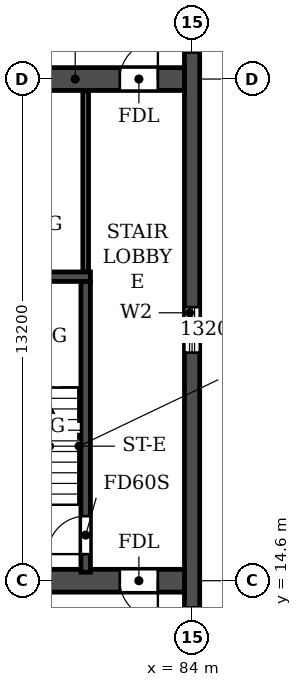
"""IFC4 building model, lengths in metres.
Left out: names, types, materials, properties, quantities, classifications, styles, units other than length and angle.
Written with IfcOpenShell. Run it as: python <this file> out.ifc"""

import sys

from ifc_helpers import new_model, si_unit, direction, frame, frame_2d, origin, place, context, subcontext, project, spatial, rectangle, extrude, element, fill, save


model = new_model("IFC4")
c1 = context("Model", 3, precision=1e-05, world=origin(), true_north=direction((0.0, 1.0)))
c2 = subcontext(c1, "Body", "Model", "MODEL_VIEW")
j1 = project(units=[si_unit("LENGTHUNIT", "METRE"), si_unit("PLANEANGLEUNIT", "RADIAN")], contexts=[c1])
p1 = place(None, origin())
s1 = spatial("IfcSite", under=j1, at=p1, CompositionType="ELEMENT")
p2 = place(p1, origin())
s2 = spatial("IfcBuilding", under=s1, at=p2, CompositionType="ELEMENT")
p3 = place(p2, frame((0.0, 0.0, 165.3)))
s3 = spatial("IfcBuildingStorey", under=s2, at=p3, CompositionType="ELEMENT", Elevation=165.3)
p4 = place(p3, frame((84.0, 4.683, 0.0), z_axis=(0.0, 0.0, 1.0), x_axis=(0.0, 1.0, 0.0)))
e1 = element("IfcWall", 1, at=p4, inside=s3, PredefinedType="SHEAR", context=c2, shape_type="SweptSolid", body=[
    extrude(rectangle(XDim=33.034, YDim=0.4, at=frame_2d((16.517, 0.0))), origin(), (0.0, 0.0, 1.0), 6.38),
])
p5 = place(p4, frame((23.817, 0.0, 0.9)))
e2 = element("IfcOpeningElement", 2, at=p5, cuts=e1, PredefinedType="OPENING", context=c2, shape_type="SweptSolid", body=[
    extrude(rectangle(XDim=1.2, YDim=1.5, at=frame_2d((0.6, 0.75))), frame((0.0, 0.21, 0.0), z_axis=(0.0, -1.0, 0.0), x_axis=(1.0, 0.0, 0.0)), (0.0, 0.0, 1.0), 0.42),
])
p6 = place(p4, frame((8.017, 0.0, 0.9)))
e3 = element("IfcOpeningElement", 3, at=p6, cuts=e1, PredefinedType="OPENING", context=c2, shape_type="SweptSolid", body=[
    extrude(rectangle(XDim=1.2, YDim=1.5, at=frame_2d((0.6, 0.75))), frame((0.0, 0.21, 0.0), z_axis=(0.0, -1.0, 0.0), x_axis=(1.0, 0.0, 0.0)), (0.0, 0.0, 1.0), 0.42),
])
p7 = place(p4, frame((15.917, 0.0, 0.9)))
e4 = element("IfcOpeningElement", 4, at=p7, cuts=e1, PredefinedType="OPENING", context=c2, shape_type="SweptSolid", body=[
    extrude(rectangle(XDim=1.2, YDim=1.5, at=frame_2d((0.6, 0.75))), frame((0.0, 0.21, 0.0), z_axis=(0.0, -1.0, 0.0), x_axis=(1.0, 0.0, 0.0)), (0.0, 0.0, 1.0), 0.42),
])
p8 = place(p3, frame((77.1, 14.6, 0.0), z_axis=(0.0, 0.0, 1.0), x_axis=(1.0, 0.0, 0.0)))
e5 = element("IfcWall", 5, at=p8, inside=s3, PredefinedType="SOLIDWALL", context=c2, shape_type="SweptSolid", body=[
    extrude(rectangle(XDim=6.7, YDim=0.6, at=frame_2d((3.35, 0.0))), origin(), (0.0, 0.0, 1.0), 6.38),
])
p9 = place(p8, frame((5.0, 0.0, 0.0)))
e6 = element("IfcOpeningElement", 6, at=p9, cuts=e5, PredefinedType="OPENING", context=c2, shape_type="SweptSolid", body=[
    extrude(rectangle(XDim=1.0, YDim=2.1, at=frame_2d((0.5, 1.05))), frame((0.0, 0.31, 0.0), z_axis=(0.0, -1.0, 0.0), x_axis=(1.0, 0.0, 0.0)), (0.0, 0.0, 1.0), 0.62),
])
p10 = place(p3, frame((77.1, 27.8, 0.0), z_axis=(0.0, 0.0, 1.0), x_axis=(1.0, 0.0, 0.0)))
e7 = element("IfcWall", 7, at=p10, inside=s3, PredefinedType="SOLIDWALL", context=c2, shape_type="SweptSolid", body=[
    extrude(rectangle(XDim=6.7, YDim=0.6, at=frame_2d((3.35, 0.0))), origin(), (0.0, 0.0, 1.0), 6.38),
])
p11 = place(p10, frame((1.75, 0.0, 0.0)))
e8 = element("IfcOpeningElement", 8, at=p11, cuts=e7, PredefinedType="OPENING", context=c2, shape_type="SweptSolid", body=[
    extrude(rectangle(XDim=0.9, YDim=2.1, at=frame_2d((0.45, 1.05))), frame((0.0, 0.31, 0.0), z_axis=(0.0, -1.0, 0.0), x_axis=(1.0, 0.0, 0.0)), (0.0, 0.0, 1.0), 0.62),
])
p12 = place(p10, frame((5.0, 0.0, 0.0)))
e9 = element("IfcOpeningElement", 9, at=p12, cuts=e7, PredefinedType="OPENING", context=c2, shape_type="SweptSolid", body=[
    extrude(rectangle(XDim=1.0, YDim=2.1, at=frame_2d((0.5, 1.05))), frame((0.0, 0.31, 0.0), z_axis=(0.0, -1.0, 0.0), x_axis=(1.0, 0.0, 0.0)), (0.0, 0.0, 1.0), 0.62),
])
p13 = place(p3, frame((81.2, 14.825, 0.0), z_axis=(0.0, 0.0, 1.0), x_axis=(0.0, 1.0, 0.0)))
e10 = element("IfcWall", 10, at=p13, inside=s3, PredefinedType="SOLIDWALL", context=c2, shape_type="SweptSolid", body=[
    extrude(rectangle(XDim=7.65, YDim=0.25, at=frame_2d((3.825, 0.0))), origin(), (0.0, 0.0, 1.0), 6.38),
])
p14 = place(p13, frame((0.475, 0.0, 0.0)))
e11 = element("IfcOpeningElement", 11, at=p14, cuts=e10, PredefinedType="OPENING", context=c2, shape_type="SweptSolid", body=[
    extrude(rectangle(XDim=1.0, YDim=2.1, at=frame_2d((0.5, 1.05))), frame((0.0, 0.135, 0.0), z_axis=(0.0, -1.0, 0.0), x_axis=(1.0, 0.0, 0.0)), (0.0, 0.0, 1.0), 0.27),
])
p15 = place(p3, frame((77.275, 22.6, 0.0), z_axis=(0.0, 0.0, 1.0), x_axis=(1.0, 0.0, 0.0)))
e12 = element("IfcWall", 12, at=p15, inside=s3, PredefinedType="SOLIDWALL", context=c2, shape_type="SweptSolid", body=[
    extrude(rectangle(XDim=4.05, YDim=0.25, at=frame_2d((2.025, 0.0))), origin(), (0.0, 0.0, 1.0), 6.38),
])
p16 = place(p3, frame((81.2, 22.735, 0.0), z_axis=(0.0, 0.0, 1.0), x_axis=(0.0, 1.0, 0.0)))
e13 = element("IfcWall", 13, at=p16, inside=s3, PredefinedType="PARTITIONING", context=c2, shape_type="SweptSolid", body=[
    extrude(rectangle(XDim=4.755, YDim=0.15, at=frame_2d((2.377, 0.0))), origin(), (0.0, 0.0, 1.0), 6.38),
])
p17 = place(p6, origin())
e14 = element("IfcWindow", 14, at=p17, inside=s3, PartitioningType="SINGLE_PANEL", PredefinedType="WINDOW", context=c2, shape_type="SweptSolid", body=[
    extrude(rectangle(XDim=1.2, YDim=1.5, at=frame_2d((0.6, 0.75))), frame((0.0, 0.03, 0.0), z_axis=(0.0, -1.0, 0.0), x_axis=(1.0, 0.0, 0.0)), (0.0, 0.0, 1.0), 0.06),
])
fill(e3, e14)
p18 = place(p7, origin())
e15 = element("IfcWindow", 15, at=p18, inside=s3, PartitioningType="SINGLE_PANEL", PredefinedType="WINDOW", context=c2, shape_type="SweptSolid", body=[
    extrude(rectangle(XDim=1.2, YDim=1.5, at=frame_2d((0.6, 0.75))), frame((0.0, 0.03, 0.0), z_axis=(0.0, -1.0, 0.0), x_axis=(1.0, 0.0, 0.0)), (0.0, 0.0, 1.0), 0.06),
])
fill(e4, e15)
p19 = place(p12, origin())
e16 = element("IfcDoor", 16, at=p19, inside=s3, OperationType="SINGLE_SWING_RIGHT", PredefinedType="DOOR", context=c2, shape_type="SweptSolid", body=[
    extrude(rectangle(XDim=1.0, YDim=2.1, at=frame_2d((0.5, 1.05))), frame((0.0, 0.025, 0.0), z_axis=(0.0, -1.0, 0.0), x_axis=(1.0, 0.0, 0.0)), (0.0, 0.0, 1.0), 0.05),
])
fill(e9, e16)
p20 = place(p9, frame((1.0, 0.0, 0.0), z_axis=(0.0, 0.0, 1.0), x_axis=(-1.0, 0.0, 0.0)))
e17 = element("IfcDoor", 17, at=p20, inside=s3, OperationType="SINGLE_SWING_LEFT", PredefinedType="DOOR", context=c2, shape_type="SweptSolid", body=[
    extrude(rectangle(XDim=1.0, YDim=2.1, at=frame_2d((0.5, 1.05))), frame((0.0, 0.025, 0.0), z_axis=(0.0, -1.0, 0.0), x_axis=(1.0, 0.0, 0.0)), (0.0, 0.0, 1.0), 0.05),
])
fill(e6, e17)
p21 = place(p14, origin())
e18 = element("IfcDoor", 18, at=p21, inside=s3, OperationType="SINGLE_SWING_LEFT", PredefinedType="DOOR", context=c2, shape_type="SweptSolid", body=[
    extrude(rectangle(XDim=1.0, YDim=2.1, at=frame_2d((0.5, 1.05))), frame((0.0, 0.025, 0.0), z_axis=(0.0, -1.0, 0.0), x_axis=(1.0, 0.0, 0.0)), (0.0, 0.0, 1.0), 0.05),
])
fill(e11, e18)
save(model, sys.argv[1])
